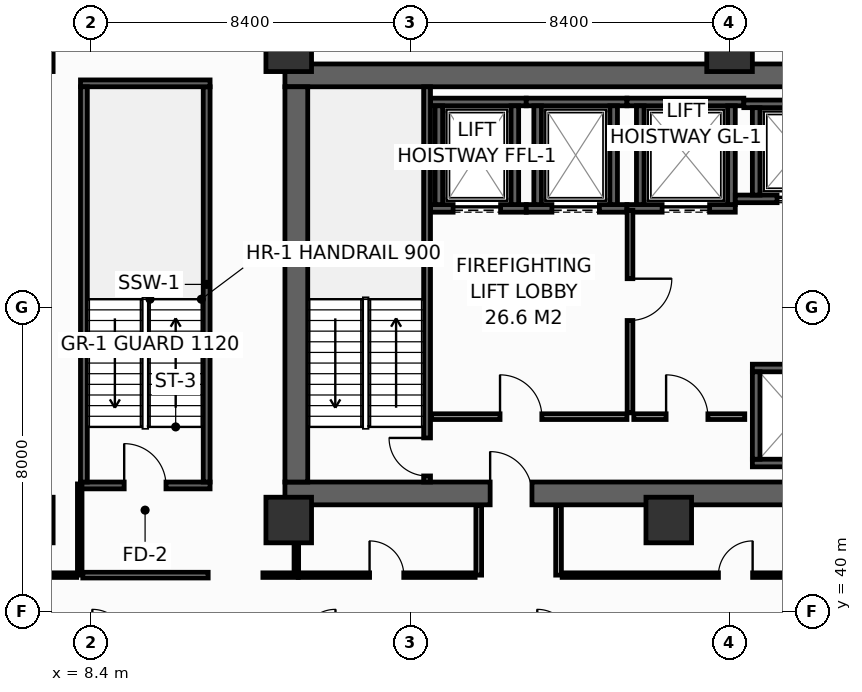
"""IFC4 building model, lengths in metres.
Left out: names, types, materials, properties, quantities, classifications, styles, units other than length and angle.
Written with IfcOpenShell. Run it as: python <this file> out.ifc"""

import sys

from ifc_helpers import new_model, si_unit, direction, frame, frame_2d, origin, origin_2d, place, context, subcontext, project, spatial, rectangle, hollow_rectangle, extrude, element, fill, save


model = new_model("IFC4")
c1 = context("Model", 3, precision=1e-05, world=origin(), true_north=direction((0.0, 1.0)))
c2 = subcontext(c1, "Body", "Model", "MODEL_VIEW")
j1 = project(units=[si_unit("LENGTHUNIT", "METRE"), si_unit("PLANEANGLEUNIT", "RADIAN")], contexts=[c1])
p1 = place(None, origin())
s1 = spatial("IfcSite", under=j1, at=p1, CompositionType="ELEMENT")
p2 = place(p1, origin())
s2 = spatial("IfcBuilding", under=s1, at=p2, CompositionType="ELEMENT")
p3 = place(p2, frame((0.0, 0.0, 97.2)))
s3 = spatial("IfcBuildingStorey", under=s2, at=p3, CompositionType="ELEMENT", Elevation=97.2)
p4 = place(p3, frame((13.5, 43.1, 0.0), z_axis=(0.0, 0.0, 1.0), x_axis=(1.0, 0.0, 0.0)))
e1 = element("IfcWall", 1, at=p4, inside=s3, PredefinedType="SHEAR", context=c2, shape_type="SweptSolid", body=[
    extrude(rectangle(XDim=32.9, YDim=0.6, at=frame_2d((16.45, 0.0))), origin(), (0.0, 0.0, 1.0), 4.15),
])
p5 = place(p4, frame((5.4, 0.0, 0.0)))
e2 = element("IfcOpeningElement", 2, at=p5, cuts=e1, PredefinedType="OPENING", context=c2, shape_type="SweptSolid", body=[
    extrude(rectangle(XDim=1.1, YDim=2.15, at=frame_2d((0.55, 1.075))), frame((0.0, 0.31, 0.0), z_axis=(0.0, -1.0, 0.0), x_axis=(1.0, 0.0, 0.0)), (0.0, 0.0, 1.0), 0.62),
])
p6 = place(p4, frame((25.6, 0.0, 0.0)))
e3 = element("IfcOpeningElement", 3, at=p6, cuts=e1, PredefinedType="OPENING", context=c2, shape_type="SweptSolid", body=[
    extrude(rectangle(XDim=1.1, YDim=2.15, at=frame_2d((0.55, 1.075))), frame((0.0, 0.31, 0.0), z_axis=(0.0, -1.0, 0.0), x_axis=(1.0, 0.0, 0.0)), (0.0, 0.0, 1.0), 0.62),
])
p7 = place(p3, frame((13.5, 54.1, 0.0), z_axis=(0.0, 0.0, 1.0), x_axis=(1.0, 0.0, 0.0)))
e4 = element("IfcWall", 4, at=p7, inside=s3, PredefinedType="SHEAR", context=c2, shape_type="SweptSolid", body=[
    extrude(rectangle(XDim=32.9, YDim=0.6, at=frame_2d((16.45, 0.0))), origin(), (0.0, 0.0, 1.0), 4.15),
])
p8 = place(p3, frame((13.8, 43.4, 0.0), z_axis=(0.0, 0.0, 1.0), x_axis=(0.0, 1.0, 0.0)))
e5 = element("IfcWall", 5, at=p8, inside=s3, PredefinedType="SHEAR", context=c2, shape_type="SweptSolid", body=[
    extrude(rectangle(XDim=10.4, YDim=0.6, at=frame_2d((5.2, 0.0))), origin(), (0.0, 0.0, 1.0), 4.15),
])
for number, where, z_axis, x_axis in (
    (6, (6.8, 54.8, 0.0), (0.0, 0.0, 1.0), (1.0, 0.0, 0.0)),
    (7, (13.6, 54.8, 0.0), (0.0, 0.0, 1.0), (1.0, 0.0, 0.0)),
    (8, (25.2, 54.8, 0.0), (0.0, 0.0, 1.0), (1.0, 0.0, 0.0)),
    (9, (6.8, 42.4, 0.0), (0.0, 0.0, 1.0), (1.0, 0.0, 0.0)),
    (10, (13.6, 42.4, 0.0), (0.0, 0.0, 1.0), (1.0, 0.0, 0.0)),
    (11, (23.6, 42.4, 0.0), (0.0, 0.0, 1.0), (1.0, 0.0, 0.0)),
):
    element("IfcColumn", number, at=place(p3, frame(where, z_axis=z_axis, x_axis=x_axis)), inside=s3, PredefinedType="COLUMN", context=c2, shape_type="SweptSolid", body=[
        extrude(hollow_rectangle(XDim=1.2, YDim=1.2, WallThickness=0.055, at=origin_2d()), origin(), (0.0, 0.0, 1.0), 4.4),
    ])
p9 = place(p3, frame((17.33, 50.6, 0.0), z_axis=(0.0, 0.0, 1.0), x_axis=(1.0, 0.0, 0.0)))
e12 = element("IfcWall", 12, at=p9, inside=s3, PredefinedType="SHEAR", context=c2, shape_type="SweptSolid", body=[
    extrude(rectangle(XDim=2.52, YDim=0.2, at=frame_2d((1.26, 0.0))), origin(), (0.0, 0.0, 1.0), 4.15),
])
p10 = place(p9, frame((0.595, 0.0, 0.0)))
e13 = element("IfcOpeningElement", 13, at=p10, cuts=e12, PredefinedType="OPENING", context=c2, shape_type="SweptSolid", body=[
    extrude(rectangle(XDim=1.25, YDim=2.3, at=frame_2d((0.625, 1.15))), frame((0.0, 0.11, 0.0), z_axis=(0.0, -1.0, 0.0), x_axis=(1.0, 0.0, 0.0)), (0.0, 0.0, 1.0), 0.22),
])
p11 = place(p3, frame((17.33, 53.4, 0.0), z_axis=(0.0, 0.0, 1.0), x_axis=(1.0, 0.0, 0.0)))
e14 = element("IfcWall", 14, at=p11, inside=s3, PredefinedType="SHEAR", context=c2, shape_type="SweptSolid", body=[
    extrude(rectangle(XDim=2.52, YDim=0.2, at=frame_2d((1.26, 0.0))), origin(), (0.0, 0.0, 1.0), 4.15),
])
for number, where, z_axis, x_axis in (
    (15, (17.55, 50.7, 0.0), (0.0, 0.0, 1.0), (0.0, 1.0, 0.0)),
    (16, (19.55, 50.7, 0.0), (0.0, 0.0, 1.0), (0.0, 1.0, 0.0)),
):
    element("IfcWall", number, at=place(p3, frame(where, z_axis=z_axis, x_axis=x_axis)), inside=s3, PredefinedType="SHEAR", context=c2, shape_type="SweptSolid", body=[
        extrude(rectangle(XDim=2.6, YDim=0.2, at=frame_2d((1.3, 0.0))), origin(), (0.0, 0.0, 1.0), 4.15),
    ])
p12 = place(p3, frame((19.85, 50.6, 0.0), z_axis=(0.0, 0.0, 1.0), x_axis=(1.0, 0.0, 0.0)))
e17 = element("IfcWall", 17, at=p12, inside=s3, PredefinedType="SHEAR", context=c2, shape_type="SweptSolid", body=[
    extrude(rectangle(XDim=2.65, YDim=0.2, at=frame_2d((1.325, 0.0))), origin(), (0.0, 0.0, 1.0), 4.15),
])
p13 = place(p12, frame((0.675, 0.0, 0.0)))
e18 = element("IfcOpeningElement", 18, at=p13, cuts=e17, PredefinedType="OPENING", context=c2, shape_type="SweptSolid", body=[
    extrude(rectangle(XDim=1.25, YDim=2.3, at=frame_2d((0.625, 1.15))), frame((0.0, 0.11, 0.0), z_axis=(0.0, -1.0, 0.0), x_axis=(1.0, 0.0, 0.0)), (0.0, 0.0, 1.0), 0.22),
])
p14 = place(p3, frame((19.85, 53.4, 0.0), z_axis=(0.0, 0.0, 1.0), x_axis=(1.0, 0.0, 0.0)))
e19 = element("IfcWall", 19, at=p14, inside=s3, PredefinedType="SHEAR", context=c2, shape_type="SweptSolid", body=[
    extrude(rectangle(XDim=2.65, YDim=0.2, at=frame_2d((1.325, 0.0))), origin(), (0.0, 0.0, 1.0), 4.15),
])
for number, where, z_axis, x_axis in (
    (20, (20.15, 50.7, 0.0), (0.0, 0.0, 1.0), (0.0, 1.0, 0.0)),
    (21, (22.15, 50.7, 0.0), (0.0, 0.0, 1.0), (0.0, 1.0, 0.0)),
):
    element("IfcWall", number, at=place(p3, frame(where, z_axis=z_axis, x_axis=x_axis)), inside=s3, PredefinedType="SHEAR", context=c2, shape_type="SweptSolid", body=[
        extrude(rectangle(XDim=2.6, YDim=0.2, at=frame_2d((1.3, 0.0))), origin(), (0.0, 0.0, 1.0), 4.15),
    ])
p15 = place(p3, frame((22.5, 50.6, 0.0), z_axis=(0.0, 0.0, 1.0), x_axis=(1.0, 0.0, 0.0)))
e22 = element("IfcWall", 22, at=p15, inside=s3, PredefinedType="SHEAR", context=c2, shape_type="SweptSolid", body=[
    extrude(rectangle(XDim=2.85, YDim=0.2, at=frame_2d((1.425, 0.0))), origin(), (0.0, 0.0, 1.0), 4.15),
])
p16 = place(p15, frame((0.925, 0.0, 0.0)))
e23 = element("IfcOpeningElement", 23, at=p16, cuts=e22, PredefinedType="OPENING", context=c2, shape_type="SweptSolid", body=[
    extrude(rectangle(XDim=1.25, YDim=2.3, at=frame_2d((0.625, 1.15))), frame((0.0, 0.11, 0.0), z_axis=(0.0, -1.0, 0.0), x_axis=(1.0, 0.0, 0.0)), (0.0, 0.0, 1.0), 0.22),
])
p17 = place(p3, frame((22.5, 53.4, 0.0), z_axis=(0.0, 0.0, 1.0), x_axis=(1.0, 0.0, 0.0)))
e24 = element("IfcWall", 24, at=p17, inside=s3, PredefinedType="SHEAR", context=c2, shape_type="SweptSolid", body=[
    extrude(rectangle(XDim=3.075, YDim=0.2, at=frame_2d((1.538, 0.0))), origin(), (0.0, 0.0, 1.0), 4.15),
])
for number, where, z_axis, x_axis in (
    (25, (22.85, 50.7, 0.0), (0.0, 0.0, 1.0), (0.0, 1.0, 0.0)),
    (26, (25.25, 50.7, 0.0), (0.0, 0.0, 1.0), (0.0, 1.0, 0.0)),
):
    element("IfcWall", number, at=place(p3, frame(where, z_axis=z_axis, x_axis=x_axis)), inside=s3, PredefinedType="SHEAR", context=c2, shape_type="SweptSolid", body=[
        extrude(rectangle(XDim=2.6, YDim=0.2, at=frame_2d((1.3, 0.0))), origin(), (0.0, 0.0, 1.0), 4.15),
    ])
p18 = place(p3, frame((25.35, 50.85, 0.0), z_axis=(0.0, 0.0, 1.0), x_axis=(1.0, 0.0, 0.0)))
e27 = element("IfcWall", 27, at=p18, inside=s3, PredefinedType="SHEAR", context=c2, shape_type="SweptSolid", body=[
    extrude(rectangle(XDim=3.025, YDim=0.2, at=frame_2d((1.512, 0.0))), origin(), (0.0, 0.0, 1.0), 4.15),
])
p19 = place(p18, frame((1.1, 0.0, 0.0)))
e28 = element("IfcOpeningElement", 28, at=p19, cuts=e27, PredefinedType="OPENING", context=c2, shape_type="SweptSolid", body=[
    extrude(rectangle(XDim=1.1, YDim=2.2, at=frame_2d((0.55, 1.1))), frame((0.0, 0.11, 0.0), z_axis=(0.0, -1.0, 0.0), x_axis=(1.0, 0.0, 0.0)), (0.0, 0.0, 1.0), 0.22),
])
p20 = place(p3, frame((25.575, 53.35, 0.0), z_axis=(0.0, 0.0, 1.0), x_axis=(1.0, 0.0, 0.0)))
e29 = element("IfcWall", 29, at=p20, inside=s3, PredefinedType="SHEAR", context=c2, shape_type="SweptSolid", body=[
    extrude(rectangle(XDim=2.8, YDim=0.2, at=frame_2d((1.4, 0.0))), origin(), (0.0, 0.0, 1.0), 4.15),
])
p21 = place(p3, frame((25.9, 50.95, 0.0), z_axis=(0.0, 0.0, 1.0), x_axis=(0.0, 1.0, 0.0)))
e30 = element("IfcWall", 30, at=p21, inside=s3, PredefinedType="SHEAR", context=c2, shape_type="SweptSolid", body=[
    extrude(rectangle(XDim=2.3, YDim=0.2, at=frame_2d((1.15, 0.0))), origin(), (0.0, 0.0, 1.0), 4.15),
])
for number, where, z_axis, x_axis in (
    (31, (25.8, 43.9, 0.0), (0.0, 0.0, 1.0), (1.0, 0.0, 0.0)),
    (32, (25.8, 46.4, 0.0), (0.0, 0.0, 1.0), (1.0, 0.0, 0.0)),
):
    element("IfcWall", number, at=place(p3, frame(where, z_axis=z_axis, x_axis=x_axis)), inside=s3, PredefinedType="SHEAR", context=c2, shape_type="SweptSolid", body=[
        extrude(rectangle(XDim=2.575, YDim=0.2, at=frame_2d((1.288, 0.0))), origin(), (0.0, 0.0, 1.0), 4.15),
    ])
p22 = place(p3, frame((25.9, 44.0, 0.0), z_axis=(0.0, 0.0, 1.0), x_axis=(0.0, 1.0, 0.0)))
e33 = element("IfcWall", 33, at=p22, inside=s3, PredefinedType="SHEAR", context=c2, shape_type="SweptSolid", body=[
    extrude(rectangle(XDim=2.3, YDim=0.2, at=frame_2d((1.15, 0.0))), origin(), (0.0, 0.0, 1.0), 4.15),
])
p23 = place(p3, frame((17.24, 43.4, 0.0), z_axis=(0.0, 0.0, 1.0), x_axis=(0.0, 1.0, 0.0)))
e34 = element("IfcWall", 34, at=p23, inside=s3, PredefinedType="SHEAR", context=c2, shape_type="SweptSolid", body=[
    extrude(rectangle(XDim=10.4, YDim=0.18, at=frame_2d((5.2, 0.0))), origin(), (0.0, 0.0, 1.0), 4.15),
])
p24 = place(p23, frame((0.16, 0.0, 0.0)))
e35 = element("IfcOpeningElement", 35, at=p24, cuts=e34, PredefinedType="OPENING", context=c2, shape_type="SweptSolid", body=[
    extrude(rectangle(XDim=1.0, YDim=2.15, at=frame_2d((0.5, 1.075))), frame((0.0, 0.1, 0.0), z_axis=(0.0, -1.0, 0.0), x_axis=(1.0, 0.0, 0.0)), (0.0, 0.0, 1.0), 0.2),
])
p25 = place(p3, frame((8.12, 43.31, 0.0), z_axis=(0.0, 0.0, 1.0), x_axis=(1.0, 0.0, 0.0)))
e36 = element("IfcWall", 36, at=p25, inside=s3, PredefinedType="SHEAR", context=c2, shape_type="SweptSolid", body=[
    extrude(rectangle(XDim=3.41, YDim=0.18, at=frame_2d((1.705, 0.0))), origin(), (0.0, 0.0, 1.0), 4.15),
])
p26 = place(p25, frame((1.15, 0.0, 0.0)))
e37 = element("IfcOpeningElement", 37, at=p26, cuts=e36, PredefinedType="OPENING", context=c2, shape_type="SweptSolid", body=[
    extrude(rectangle(XDim=1.1, YDim=2.15, at=frame_2d((0.55, 1.075))), frame((0.0, 0.1, 0.0), z_axis=(0.0, -1.0, 0.0), x_axis=(1.0, 0.0, 0.0)), (0.0, 0.0, 1.0), 0.2),
])
p27 = place(p3, frame((11.44, 43.4, 0.0), z_axis=(0.0, 0.0, 1.0), x_axis=(0.0, 1.0, 0.0)))
e38 = element("IfcWall", 38, at=p27, inside=s3, PredefinedType="SHEAR", context=c2, shape_type="SweptSolid", body=[
    extrude(rectangle(XDim=10.4, YDim=0.18, at=frame_2d((5.2, 0.0))), origin(), (0.0, 0.0, 1.0), 4.15),
])
p28 = place(p3, frame((11.53, 53.89, 0.0), z_axis=(0.0, 0.0, 1.0), x_axis=(-1.0, 0.0, 0.0)))
e39 = element("IfcWall", 39, at=p28, inside=s3, PredefinedType="SHEAR", context=c2, shape_type="SweptSolid", body=[
    extrude(rectangle(XDim=3.41, YDim=0.18, at=frame_2d((1.705, 0.0))), origin(), (0.0, 0.0, 1.0), 4.15),
])
p29 = place(p3, frame((8.21, 53.8, 0.0), z_axis=(0.0, 0.0, 1.0), x_axis=(0.0, -1.0, 0.0)))
e40 = element("IfcWall", 40, at=p29, inside=s3, PredefinedType="SHEAR", context=c2, shape_type="SweptSolid", body=[
    extrude(rectangle(XDim=10.4, YDim=0.18, at=frame_2d((5.2, 0.0))), origin(), (0.0, 0.0, 1.0), 4.15),
])
p30 = place(p3, frame((17.36, 45.12, 0.0), z_axis=(0.0, 0.0, 1.0), x_axis=(1.0, 0.0, 0.0)))
e41 = element("IfcWall", 41, at=p30, inside=s3, PredefinedType="PARTITIONING", context=c2, shape_type="SweptSolid", body=[
    extrude(rectangle(XDim=5.14, YDim=0.15, at=frame_2d((2.57, 0.0))), origin(), (0.0, 0.0, 1.0), 4.15),
])
p31 = place(p30, frame((1.8, 0.0, 0.0)))
e42 = element("IfcOpeningElement", 42, at=p31, cuts=e41, PredefinedType="OPENING", context=c2, shape_type="SweptSolid", body=[
    extrude(rectangle(XDim=1.1, YDim=2.15, at=frame_2d((0.55, 1.075))), frame((0.0, 0.085, 0.0), z_axis=(0.0, -1.0, 0.0), x_axis=(1.0, 0.0, 0.0)), (0.0, 0.0, 1.0), 0.17),
])
p32 = place(p3, frame((22.58, 50.55, 0.0), z_axis=(0.0, 0.0, 1.0), x_axis=(0.0, -1.0, 0.0)))
e43 = element("IfcWall", 43, at=p32, inside=s3, PredefinedType="PARTITIONING", context=c2, shape_type="SweptSolid", body=[
    extrude(rectangle(XDim=5.33, YDim=0.15, at=frame_2d((2.665, 0.0))), origin(), (0.0, 0.0, 1.0), 4.15),
])
p33 = place(p32, frame((1.8, 0.0, 0.0)))
e44 = element("IfcOpeningElement", 44, at=p33, cuts=e43, PredefinedType="OPENING", context=c2, shape_type="SweptSolid", body=[
    extrude(rectangle(XDim=1.1, YDim=2.15, at=frame_2d((0.55, 1.075))), frame((0.0, 0.085, 0.0), z_axis=(0.0, -1.0, 0.0), x_axis=(1.0, 0.0, 0.0)), (0.0, 0.0, 1.0), 0.17),
])
p34 = place(p3, frame((22.68, 45.12, 0.0), z_axis=(0.0, 0.0, 1.0), x_axis=(1.0, 0.0, 0.0)))
e45 = element("IfcWall", 45, at=p34, inside=s3, PredefinedType="PARTITIONING", context=c2, shape_type="SweptSolid", body=[
    extrude(rectangle(XDim=2.92, YDim=0.15, at=frame_2d((1.46, 0.0))), origin(), (0.0, 0.0, 1.0), 4.15),
])
p35 = place(p34, frame((0.85, 0.0, 0.0)))
e46 = element("IfcOpeningElement", 46, at=p35, cuts=e45, PredefinedType="OPENING", context=c2, shape_type="SweptSolid", body=[
    extrude(rectangle(XDim=1.1, YDim=2.15, at=frame_2d((0.55, 1.075))), frame((0.0, 0.085, 0.0), z_axis=(0.0, -1.0, 0.0), x_axis=(1.0, 0.0, 0.0)), (0.0, 0.0, 1.0), 0.17),
])
p36 = place(p3, frame((12.92, 40.95, 0.0), z_axis=(0.0, 0.0, 1.0), x_axis=(1.0, 0.0, 0.0)))
e47 = element("IfcWall", 47, at=p36, inside=s3, PredefinedType="PARTITIONING", context=c2, shape_type="SweptSolid", body=[
    extrude(rectangle(XDim=0.93, YDim=0.12, at=frame_2d((0.465, 0.0))), origin(), (0.0, 0.0, 1.0), 4.15),
])
p37 = place(p3, frame((13.8, 41.03, 0.0), z_axis=(0.0, 0.0, 1.0), x_axis=(0.0, 1.0, 0.0)))
e48 = element("IfcWall", 48, at=p37, inside=s3, PredefinedType="PARTITIONING", context=c2, shape_type="SweptSolid", body=[
    extrude(rectangle(XDim=1.75, YDim=0.12, at=frame_2d((0.875, 0.0))), origin(), (0.0, 0.0, 1.0), 4.15),
])
p38 = place(p3, frame((8.1, 40.95, 0.0), z_axis=(0.0, 0.0, 1.0), x_axis=(0.0, 1.0, 0.0)))
e49 = element("IfcWall", 49, at=p38, inside=s3, PredefinedType="PARTITIONING", context=c2, shape_type="SweptSolid", body=[
    extrude(rectangle(XDim=2.4, YDim=0.12, at=frame_2d((1.2, 0.0))), origin(), (0.0, 0.0, 1.0), 3.335),
])
p39 = place(p3, frame((8.18, 40.95, 0.0), z_axis=(0.0, 0.0, 1.0), x_axis=(1.0, 0.0, 0.0)))
e50 = element("IfcWall", 50, at=p39, inside=s3, PredefinedType="PARTITIONING", context=c2, shape_type="SweptSolid", body=[
    extrude(rectangle(XDim=3.3, YDim=0.15, at=frame_2d((1.65, 0.0))), origin(), (0.0, 0.0, 1.0), 4.15),
])
p40 = place(p3, frame((5.947, 40.95, 0.0), z_axis=(0.0, 0.0, 1.0), x_axis=(1.0, 0.0, 0.0)))
e51 = element("IfcWall", 51, at=p40, inside=s3, PredefinedType="PARTITIONING", context=c2, shape_type="SweptSolid", body=[
    extrude(rectangle(XDim=2.073, YDim=0.12, at=frame_2d((1.037, 0.0))), origin(), (0.0, 0.0, 1.0), 3.635),
])
for number, where, z_axis, x_axis in (
    (52, (18.6, 40.95, 0.0), (0.0, 0.0, 1.0), (0.0, 1.0, 0.0)),
    (53, (20.7, 40.95, 0.0), (0.0, 0.0, 1.0), (0.0, 1.0, 0.0)),
):
    element("IfcWall", number, at=place(p3, frame(where, z_axis=z_axis, x_axis=x_axis)), inside=s3, PredefinedType="PARTITIONING", context=c2, shape_type="SweptSolid", body=[
        extrude(rectangle(XDim=1.83, YDim=0.15, at=frame_2d((0.915, 0.0))), origin(), (0.0, 0.0, 1.0), 4.15),
    ])
p41 = place(p3, frame((13.85, 40.95, 0.0), z_axis=(0.0, 0.0, 1.0), x_axis=(1.0, 0.0, 0.0)))
e54 = element("IfcWall", 54, at=p41, inside=s3, PredefinedType="PARTITIONING", context=c2, shape_type="SweptSolid", body=[
    extrude(rectangle(XDim=4.655, YDim=0.12, at=frame_2d((2.327, 0.0))), origin(), (0.0, 0.0, 1.0), 4.15),
])
p42 = place(p41, frame((1.877, 0.0, 0.0)))
e55 = element("IfcOpeningElement", 55, at=p42, cuts=e54, PredefinedType="OPENING", context=c2, shape_type="SweptSolid", body=[
    extrude(rectangle(XDim=0.9, YDim=2.1, at=frame_2d((0.45, 1.05))), frame((0.0, 0.07, 0.0), z_axis=(0.0, -1.0, 0.0), x_axis=(1.0, 0.0, 0.0)), (0.0, 0.0, 1.0), 0.14),
])
p43 = place(p3, frame((20.795, 40.95, 0.0), z_axis=(0.0, 0.0, 1.0), x_axis=(1.0, 0.0, 0.0)))
e56 = element("IfcWall", 56, at=p43, inside=s3, PredefinedType="PARTITIONING", context=c2, shape_type="SweptSolid", body=[
    extrude(rectangle(XDim=9.125, YDim=0.12, at=frame_2d((4.562, 0.0))), origin(), (0.0, 0.0, 1.0), 2.735),
])
p44 = place(p43, frame((4.112, 0.0, 0.0)))
e57 = element("IfcOpeningElement", 57, at=p44, cuts=e56, PredefinedType="OPENING", context=c2, shape_type="SweptSolid", body=[
    extrude(rectangle(XDim=0.9, YDim=2.1, at=frame_2d((0.45, 1.05))), frame((0.0, 0.07, 0.0), z_axis=(0.0, -1.0, 0.0), x_axis=(1.0, 0.0, 0.0)), (0.0, 0.0, 1.0), 0.14),
])
p45 = place(p10, origin())
e58 = element("IfcDoor", 58, at=p45, inside=s3, OperationType="SLIDING_TO_LEFT", PredefinedType="DOOR", context=c2, shape_type="SweptSolid", body=[
    extrude(rectangle(XDim=1.25, YDim=2.3, at=frame_2d((0.625, 1.15))), frame((0.0, 0.025, 0.0), z_axis=(0.0, -1.0, 0.0), x_axis=(1.0, 0.0, 0.0)), (0.0, 0.0, 1.0), 0.05),
])
fill(e13, e58)
p46 = place(p13, origin())
e59 = element("IfcDoor", 59, at=p46, inside=s3, OperationType="SLIDING_TO_LEFT", PredefinedType="DOOR", context=c2, shape_type="SweptSolid", body=[
    extrude(rectangle(XDim=1.25, YDim=2.3, at=frame_2d((0.625, 1.15))), frame((0.0, 0.025, 0.0), z_axis=(0.0, -1.0, 0.0), x_axis=(1.0, 0.0, 0.0)), (0.0, 0.0, 1.0), 0.05),
])
fill(e18, e59)
p47 = place(p16, origin())
e60 = element("IfcDoor", 60, at=p47, inside=s3, OperationType="SLIDING_TO_LEFT", PredefinedType="DOOR", context=c2, shape_type="SweptSolid", body=[
    extrude(rectangle(XDim=1.25, YDim=2.3, at=frame_2d((0.625, 1.15))), frame((0.0, 0.025, 0.0), z_axis=(0.0, -1.0, 0.0), x_axis=(1.0, 0.0, 0.0)), (0.0, 0.0, 1.0), 0.05),
])
fill(e23, e60)
p48 = place(p19, origin())
e61 = element("IfcDoor", 61, at=p48, inside=s3, OperationType="SLIDING_TO_LEFT", PredefinedType="DOOR", context=c2, shape_type="SweptSolid", body=[
    extrude(rectangle(XDim=1.1, YDim=2.2, at=frame_2d((0.55, 1.1))), frame((0.0, 0.025, 0.0), z_axis=(0.0, -1.0, 0.0), x_axis=(1.0, 0.0, 0.0)), (0.0, 0.0, 1.0), 0.05),
])
fill(e28, e61)
p49 = place(p24, origin())
e62 = element("IfcDoor", 62, at=p49, inside=s3, OperationType="SINGLE_SWING_RIGHT", PredefinedType="DOOR", context=c2, shape_type="SweptSolid", body=[
    extrude(rectangle(XDim=1.0, YDim=2.15, at=frame_2d((0.5, 1.075))), frame((0.0, 0.025, 0.0), z_axis=(0.0, -1.0, 0.0), x_axis=(1.0, 0.0, 0.0)), (0.0, 0.0, 1.0), 0.05),
])
fill(e35, e62)
p50 = place(p26, origin())
e63 = element("IfcDoor", 63, at=p50, inside=s3, OperationType="SINGLE_SWING_LEFT", PredefinedType="DOOR", context=c2, shape_type="SweptSolid", body=[
    extrude(rectangle(XDim=1.1, YDim=2.15, at=frame_2d((0.55, 1.075))), frame((0.0, 0.025, 0.0), z_axis=(0.0, -1.0, 0.0), x_axis=(1.0, 0.0, 0.0)), (0.0, 0.0, 1.0), 0.05),
])
fill(e37, e63)
p51 = place(p31, origin())
e64 = element("IfcDoor", 64, at=p51, inside=s3, OperationType="SINGLE_SWING_LEFT", PredefinedType="DOOR", context=c2, shape_type="SweptSolid", body=[
    extrude(rectangle(XDim=1.1, YDim=2.15, at=frame_2d((0.55, 1.075))), frame((0.0, 0.025, 0.0), z_axis=(0.0, -1.0, 0.0), x_axis=(1.0, 0.0, 0.0)), (0.0, 0.0, 1.0), 0.05),
])
fill(e42, e64)
p52 = place(p33, origin())
e65 = element("IfcDoor", 65, at=p52, inside=s3, OperationType="SINGLE_SWING_LEFT", PredefinedType="DOOR", context=c2, shape_type="SweptSolid", body=[
    extrude(rectangle(XDim=1.1, YDim=2.15, at=frame_2d((0.55, 1.075))), frame((0.0, 0.025, 0.0), z_axis=(0.0, -1.0, 0.0), x_axis=(1.0, 0.0, 0.0)), (0.0, 0.0, 1.0), 0.05),
])
fill(e44, e65)
p53 = place(p35, origin())
e66 = element("IfcDoor", 66, at=p53, inside=s3, OperationType="SINGLE_SWING_LEFT", PredefinedType="DOOR", context=c2, shape_type="SweptSolid", body=[
    extrude(rectangle(XDim=1.1, YDim=2.15, at=frame_2d((0.55, 1.075))), frame((0.0, 0.025, 0.0), z_axis=(0.0, -1.0, 0.0), x_axis=(1.0, 0.0, 0.0)), (0.0, 0.0, 1.0), 0.05),
])
fill(e46, e66)
p54 = place(p5, origin())
e67 = element("IfcDoor", 67, at=p54, inside=s3, OperationType="SINGLE_SWING_LEFT", PredefinedType="DOOR", context=c2, shape_type="SweptSolid", body=[
    extrude(rectangle(XDim=1.1, YDim=2.15, at=frame_2d((0.55, 1.075))), frame((0.0, 0.025, 0.0), z_axis=(0.0, -1.0, 0.0), x_axis=(1.0, 0.0, 0.0)), (0.0, 0.0, 1.0), 0.05),
])
fill(e2, e67)
p55 = place(p42, origin())
e68 = element("IfcDoor", 68, at=p55, inside=s3, OperationType="SINGLE_SWING_LEFT", PredefinedType="DOOR", context=c2, shape_type="SweptSolid", body=[
    extrude(rectangle(XDim=0.9, YDim=2.1, at=frame_2d((0.45, 1.05))), frame((0.0, 0.025, 0.0), z_axis=(0.0, -1.0, 0.0), x_axis=(1.0, 0.0, 0.0)), (0.0, 0.0, 1.0), 0.05),
])
fill(e55, e68)
p56 = place(p44, origin())
e69 = element("IfcDoor", 69, at=p56, inside=s3, OperationType="SINGLE_SWING_RIGHT", PredefinedType="DOOR", context=c2, shape_type="SweptSolid", body=[
    extrude(rectangle(XDim=0.9, YDim=2.1, at=frame_2d((0.45, 1.05))), frame((0.0, 0.025, 0.0), z_axis=(0.0, -1.0, 0.0), x_axis=(1.0, 0.0, 0.0)), (0.0, 0.0, 1.0), 0.05),
])
fill(e57, e69)
save(model, sys.argv[1])
